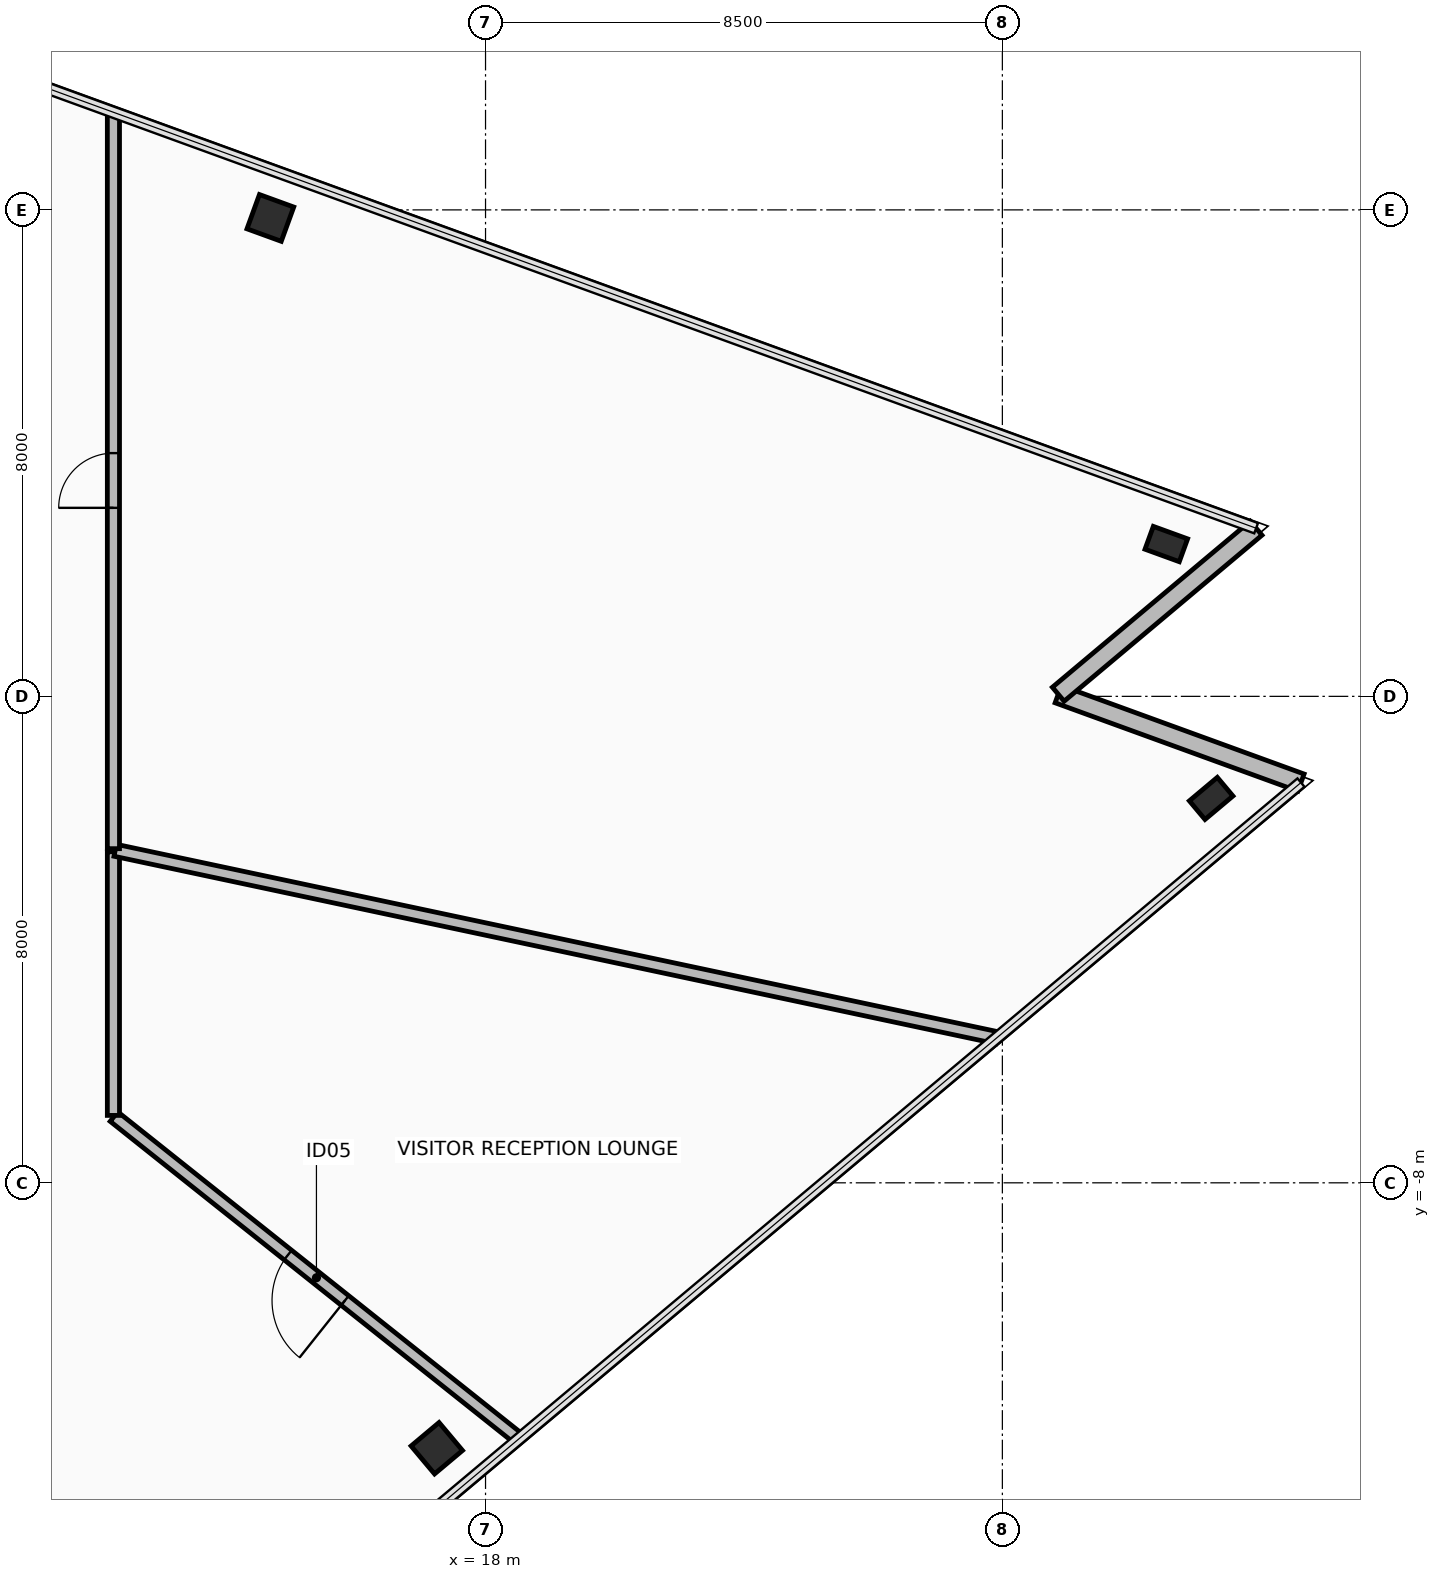
"""IFC4 building model, lengths in metres.
Left out: names, types, materials, properties, quantities, classifications, styles, units other than length and angle.
Written with IfcOpenShell. Run it as: python <this file> out.ifc"""

import sys

from ifc_helpers import new_model, si_unit, direction, frame, frame_2d, origin, origin_2d, place, context, subcontext, project, spatial, rectangle, hollow_rectangle, extrude, element, fill, save


model = new_model("IFC4")
c1 = context("Model", 3, precision=1e-05, world=origin(), true_north=direction((0.0, 1.0)))
c2 = subcontext(c1, "Body", "Model", "MODEL_VIEW")
j1 = project(units=[si_unit("LENGTHUNIT", "METRE"), si_unit("PLANEANGLEUNIT", "RADIAN")], contexts=[c1])
p1 = place(None, origin())
s1 = spatial("IfcSite", under=j1, at=p1, CompositionType="ELEMENT")
p2 = place(p1, origin())
s2 = spatial("IfcBuilding", under=s1, at=p2, CompositionType="ELEMENT")
p3 = place(p2, frame((0.0, 0.0, 181.3)))
s3 = spatial("IfcBuildingStorey", under=s2, at=p3, CompositionType="ELEMENT", Elevation=181.3)
p4 = place(p3, frame((17.198, -12.365, 0.0), z_axis=(0.0, 0.0, 1.0), x_axis=(0.766043321242, 0.642788946685, 0.0)))
e1 = element("IfcColumn", 1, at=p4, inside=s3, PredefinedType="COLUMN", context=c2, shape_type="SweptSolid", body=[
    extrude(hollow_rectangle(XDim=0.6, YDim=0.6, WallThickness=0.036, at=origin_2d()), origin(), (0.0, 0.0, 1.0), 3.6),
])
for number, where, z_axis, x_axis in (
    (2, (29.934, -1.679, 0.0), (0.0, 0.0, 1.0), (0.766, 0.643, 0.0)),
    (3, (29.196, 2.505, 0.0), (0.0, 0.0, 1.0), (-0.94, 0.342, 0.0)),
):
    element("IfcColumn", number, at=place(p3, frame(where, z_axis=z_axis, x_axis=x_axis)), inside=s3, PredefinedType="COLUMN", context=c2, shape_type="SweptSolid", body=[
        extrude(hollow_rectangle(XDim=0.4, YDim=0.6, WallThickness=0.03, at=origin_2d()), origin(), (0.0, 0.0, 1.0), 3.6),
    ])
p5 = place(p3, frame((14.461, 7.868, 0.0), z_axis=(0.0, 0.0, 1.0), x_axis=(-0.939692023847, 0.342021783398, 0.0)))
e4 = element("IfcColumn", 4, at=p5, inside=s3, PredefinedType="COLUMN", context=c2, shape_type="SweptSolid", body=[
    extrude(hollow_rectangle(XDim=0.6, YDim=0.6, WallThickness=0.036, at=origin_2d()), origin(), (0.0, 0.0, 1.0), 3.6),
])
for number, where, z_axis, x_axis in (
    (5, (31.411, -1.418, 0.0), (0.0, 0.0, 1.0), (-0.94, 0.342, 0.0)),
    (6, (27.419, 0.035, 0.0), (0.0, 0.0, 1.0), (0.766, 0.643, 0.0)),
):
    element("IfcWall", number, at=place(p3, frame(where, z_axis=z_axis, x_axis=x_axis)), inside=s3, PredefinedType="STANDARD", context=c2, shape_type="SweptSolid", body=[
        extrude(rectangle(XDim=4.248, YDim=0.3, at=frame_2d((2.124, 0.0))), origin(), (0.0, 0.0, 1.0), 2.715),
    ])
p6 = place(p3, frame((7.144, -10.591, 0.0), z_axis=(0.0, 0.0, 1.0), x_axis=(0.559187972466, -0.829040898539, 0.0)))
e7 = element("IfcWall", 7, at=p6, inside=s3, PredefinedType="PARTITIONING", context=c2, shape_type="SweptSolid", body=[
    extrude(rectangle(XDim=8.597, YDim=0.2, at=frame_2d((4.298, 0.0))), origin(), (0.0, 0.0, 1.0), 2.715),
])
p7 = place(p3, frame((18.548, -12.211, 0.0), z_axis=(0.0, 0.0, 1.0), x_axis=(-0.782380574332, 0.622800639778, 0.0)))
e8 = element("IfcWall", 8, at=p7, inside=s3, PredefinedType="PARTITIONING", context=c2, shape_type="SweptSolid", body=[
    extrude(rectangle(XDim=8.511, YDim=0.2, at=frame_2d((4.255, 0.0))), origin(), (0.0, 0.0, 1.0), 2.715),
])
p8 = place(p7, frame((3.655, 0.0, 0.0)))
e9 = element("IfcOpeningElement", 9, at=p8, cuts=e8, PredefinedType="OPENING", context=c2, shape_type="SweptSolid", body=[
    extrude(rectangle(XDim=1.2, YDim=2.15, at=frame_2d((0.6, 1.075))), frame((0.0, 0.11, 0.0), z_axis=(0.0, -1.0, 0.0), x_axis=(1.0, 0.0, 0.0)), (0.0, 0.0, 1.0), 0.22),
])
p9 = place(p3, frame((11.88, -6.891, 0.0), z_axis=(0.0, 0.0, 1.0), x_axis=(0.0, 1.0, 0.0)))
e10 = element("IfcWall", 10, at=p9, inside=s3, PredefinedType="PARTITIONING", context=c2, shape_type="SweptSolid", body=[
    extrude(rectangle(XDim=4.335, YDim=0.2, at=frame_2d((2.168, 0.0))), origin(), (0.0, 0.0, 1.0), 2.865),
])
p10 = place(p3, frame((11.91, -2.531, 0.0), z_axis=(0.0, 0.0, 1.0), x_axis=(0.978146920781, -0.207914889719, 0.0)))
e11 = element("IfcWall", 11, at=p10, inside=s3, PredefinedType="PARTITIONING", context=c2, shape_type="SweptSolid", body=[
    extrude(rectangle(XDim=14.825, YDim=0.2, at=frame_2d((7.412, 0.0))), origin(), (0.0, 0.0, 1.0), 2.715),
])
p11 = place(p3, frame((11.88, -2.505, 0.0), z_axis=(0.0, 0.0, 1.0), x_axis=(0.0, 1.0, 0.0)))
e12 = element("IfcWall", 12, at=p11, inside=s3, PredefinedType="PARTITIONING", context=c2, shape_type="SweptSolid", body=[
    extrude(rectangle(XDim=12.111, YDim=0.2, at=frame_2d((6.055, 0.0))), origin(), (0.0, 0.0, 1.0), 2.715),
])
p12 = place(p11, frame((5.605, 0.0, 0.0)))
e13 = element("IfcOpeningElement", 13, at=p12, cuts=e12, PredefinedType="OPENING", context=c2, shape_type="SweptSolid", body=[
    extrude(rectangle(XDim=0.9, YDim=2.1, at=frame_2d((0.45, 1.05))), frame((0.0, 0.11, 0.0), z_axis=(0.0, -1.0, 0.0), x_axis=(1.0, 0.0, 0.0)), (0.0, 0.0, 1.0), 0.22),
])
p13 = place(p8, origin())
e14 = element("IfcDoor", 14, at=p13, inside=s3, OperationType="SINGLE_SWING_LEFT", PredefinedType="DOOR", context=c2, shape_type="SweptSolid", body=[
    extrude(rectangle(XDim=1.2, YDim=2.15, at=frame_2d((0.6, 1.075))), frame((0.0, 0.025, 0.0), z_axis=(0.0, -1.0, 0.0), x_axis=(1.0, 0.0, 0.0)), (0.0, 0.0, 1.0), 0.05),
])
fill(e9, e14)
p14 = place(p12, origin())
e15 = element("IfcDoor", 15, at=p14, inside=s3, OperationType="SINGLE_SWING_LEFT", PredefinedType="DOOR", context=c2, shape_type="SweptSolid", body=[
    extrude(rectangle(XDim=0.9, YDim=2.1, at=frame_2d((0.45, 1.05))), frame((0.0, 0.025, 0.0), z_axis=(0.0, -1.0, 0.0), x_axis=(1.0, 0.0, 0.0)), (0.0, 0.0, 1.0), 0.05),
])
fill(e13, e15)
save(model, sys.argv[1])
